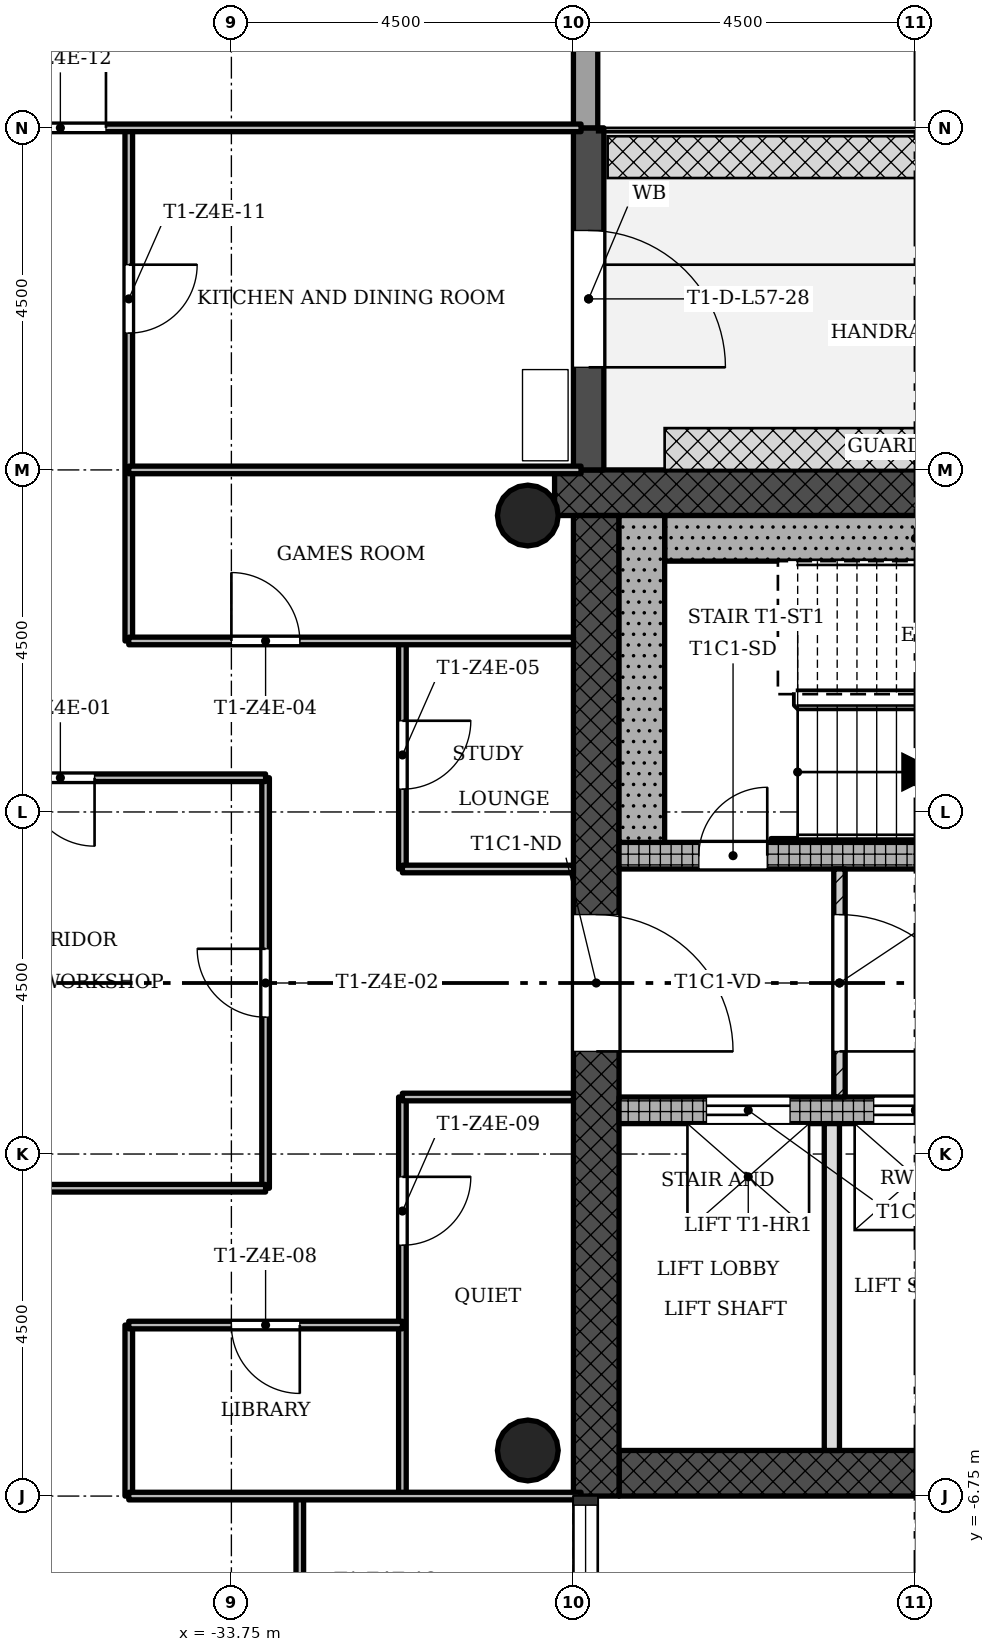
"""IFC4 building model, lengths in metres.
Left out: names, types, materials, properties, quantities, classifications, styles, units other than length and angle.
Written with IfcOpenShell. Run it as: python <this file> out.ifc"""

import sys

from ifc_helpers import new_model, si_unit, direction, frame, frame_2d, origin, origin_2d, place, context, subcontext, project, spatial, rectangle, hollow_circle, extrude, element, fill, save


model = new_model("IFC4")
c1 = context("Model", 3, precision=1e-05, world=origin(), true_north=direction((0.0, 1.0)))
c2 = subcontext(c1, "Body", "Model", "MODEL_VIEW")
j1 = project(units=[si_unit("LENGTHUNIT", "METRE"), si_unit("PLANEANGLEUNIT", "RADIAN")], contexts=[c1])
p1 = place(None, origin())
s1 = spatial("IfcSite", under=j1, at=p1, CompositionType="ELEMENT")
p2 = place(p1, origin())
s2 = spatial("IfcBuilding", under=s1, at=p2, CompositionType="ELEMENT")
p3 = place(p2, frame((0.0, 0.0, 206.2)))
s3 = spatial("IfcBuildingStorey", under=s2, at=p3, CompositionType="ELEMENT", Elevation=206.2)
p4 = place(p3, frame((-28.65, -6.45, 0.0), z_axis=(0.0, 0.0, 1.0), x_axis=(1.0, 0.0, 0.0)))
e1 = element("IfcWall", 1, at=p4, inside=s3, PredefinedType="SHEAR", context=c2, shape_type="SweptSolid", body=[
    extrude(rectangle(XDim=8.4, YDim=0.6, at=frame_2d((4.2, 0.0))), origin(), (0.0, 0.0, 1.0), 3.4),
])
p5 = place(p3, frame((-20.602, 6.45, 0.0), z_axis=(0.0, 0.0, 1.0), x_axis=(-1.0, 0.0, 0.0)))
e2 = element("IfcWall", 2, at=p5, inside=s3, PredefinedType="SHEAR", context=c2, shape_type="SweptSolid", body=[
    extrude(rectangle(XDim=8.896, YDim=0.6, at=frame_2d((4.448, 0.0))), origin(), (0.0, 0.0, 1.0), 3.4),
])
p6 = place(p3, frame((-28.95, 6.15, 0.0), z_axis=(0.0, 0.0, 1.0), x_axis=(0.0, -1.0, 0.0)))
e3 = element("IfcWall", 3, at=p6, inside=s3, PredefinedType="SHEAR", context=c2, shape_type="SweptSolid", body=[
    extrude(rectangle(XDim=12.9, YDim=0.6, at=frame_2d((6.45, 0.0))), origin(), (0.0, 0.0, 1.0), 3.4),
])
p7 = place(p6, frame((5.25, 0.0, 0.0)))
e4 = element("IfcOpeningElement", 4, at=p7, cuts=e3, PredefinedType="OPENING", context=c2, shape_type="SweptSolid", body=[
    extrude(rectangle(XDim=1.8, YDim=2.1, at=frame_2d((0.9, 1.05))), frame((0.0, 0.31, 0.0), z_axis=(0.0, -1.0, 0.0), x_axis=(1.0, 0.0, 0.0)), (0.0, 0.0, 1.0), 0.62),
])
p8 = place(p3, frame((-28.65, -1.675, 0.0), z_axis=(0.0, 0.0, 1.0), x_axis=(1.0, 0.0, 0.0)))
e5 = element("IfcWall", 5, at=p8, inside=s3, PredefinedType="SHEAR", context=c2, shape_type="SweptSolid", body=[
    extrude(rectangle(XDim=7.8, YDim=0.35, at=frame_2d((3.9, 0.0))), origin(), (0.0, 0.0, 1.0), 3.4),
])
p9 = place(p8, frame((1.15, 0.0, 0.0)))
e6 = element("IfcOpeningElement", 6, at=p9, cuts=e5, PredefinedType="OPENING", context=c2, shape_type="SweptSolid", body=[
    extrude(rectangle(XDim=1.1, YDim=2.1, at=frame_2d((0.55, 1.05))), frame((0.0, 0.185, 0.0), z_axis=(0.0, -1.0, 0.0), x_axis=(1.0, 0.0, 0.0)), (0.0, 0.0, 1.0), 0.37),
])
p10 = place(p8, frame((3.35, 0.0, 0.0)))
e7 = element("IfcOpeningElement", 7, at=p10, cuts=e5, PredefinedType="OPENING", context=c2, shape_type="SweptSolid", body=[
    extrude(rectangle(XDim=1.1, YDim=2.1, at=frame_2d((0.55, 1.05))), frame((0.0, 0.185, 0.0), z_axis=(0.0, -1.0, 0.0), x_axis=(1.0, 0.0, 0.0)), (0.0, 0.0, 1.0), 0.37),
])
p11 = place(p8, frame((5.55, 0.0, 0.0)))
e8 = element("IfcOpeningElement", 8, at=p11, cuts=e5, PredefinedType="OPENING", context=c2, shape_type="SweptSolid", body=[
    extrude(rectangle(XDim=1.1, YDim=2.1, at=frame_2d((0.55, 1.05))), frame((0.0, 0.185, 0.0), z_axis=(0.0, -1.0, 0.0), x_axis=(1.0, 0.0, 0.0)), (0.0, 0.0, 1.0), 0.37),
])
p12 = place(p3, frame((-28.65, 1.675, 0.0), z_axis=(0.0, 0.0, 1.0), x_axis=(1.0, 0.0, 0.0)))
e9 = element("IfcWall", 9, at=p12, inside=s3, PredefinedType="SHEAR", context=c2, shape_type="SweptSolid", body=[
    extrude(rectangle(XDim=7.8, YDim=0.35, at=frame_2d((3.9, 0.0))), origin(), (0.0, 0.0, 1.0), 3.4),
])
p13 = place(p12, frame((1.05, 0.0, 0.0)))
e10 = element("IfcOpeningElement", 10, at=p13, cuts=e9, PredefinedType="OPENING", context=c2, shape_type="SweptSolid", body=[
    extrude(rectangle(XDim=0.9, YDim=2.1, at=frame_2d((0.45, 1.05))), frame((0.0, 0.185, 0.0), z_axis=(0.0, -1.0, 0.0), x_axis=(1.0, 0.0, 0.0)), (0.0, 0.0, 1.0), 0.37),
])
for number, where, z_axis, x_axis in (
    (11, (-29.85, -6.15, 0.0), (0.0, 0.0, 1.0), (1.0, 0.0, 0.0)),
    (12, (-29.85, 6.15, 0.0), (0.0, 0.0, 1.0), (1.0, 0.0, 0.0)),
):
    element("IfcColumn", number, at=place(p3, frame(where, z_axis=z_axis, x_axis=x_axis)), inside=s3, PredefinedType="COLUMN", context=c2, shape_type="SweptSolid", body=[
        extrude(hollow_circle(Radius=0.4, WallThickness=0.028, at=origin_2d()), origin(), (0.0, 0.0, 1.0), 3.4),
    ])
p14 = place(p3, frame((-29.05, 6.75, -0.02), z_axis=(0.0, 0.0, 1.0), x_axis=(0.0, 1.0, 0.0)))
e13 = element("IfcWall", 13, at=p14, inside=s3, PredefinedType="STANDARD", context=c2, shape_type="SweptSolid", body=[
    extrude(rectangle(XDim=4.5, YDim=0.4, at=frame_2d((2.25, 0.0))), origin(), (0.0, 0.0, 1.0), 3.12),
])
p15 = place(p14, frame((1.35, 0.0, 0.02)))
e14 = element("IfcOpeningElement", 14, at=p15, cuts=e13, PredefinedType="OPENING", context=c2, shape_type="SweptSolid", body=[
    extrude(rectangle(XDim=1.8, YDim=2.1, at=frame_2d((0.9, 1.05))), frame((0.0, 0.21, 0.0), z_axis=(0.0, -1.0, 0.0), x_axis=(1.0, 0.0, 0.0)), (0.0, 0.0, 1.0), 0.42),
])
p16 = place(p3, frame((-29.09, 11.25, -0.3), z_axis=(0.0, 0.0, 1.0), x_axis=(0.0, 1.0, 0.0)))
e15 = element("IfcWall", 15, at=p16, inside=s3, PredefinedType="STANDARD", context=c2, shape_type="SweptSolid", body=[
    extrude(rectangle(XDim=1.82, YDim=0.32, at=frame_2d((0.91, 0.0))), origin(), (0.0, 0.0, 1.0), 3.4),
])
p17 = place(p3, frame((-25.75, -1.5, 0.0), z_axis=(0.0, 0.0, 1.0), x_axis=(0.0, 1.0, 0.0)))
e16 = element("IfcWall", 16, at=p17, inside=s3, PredefinedType="PARTITIONING", context=c2, shape_type="SweptSolid", body=[
    extrude(rectangle(XDim=3.0, YDim=0.15, at=frame_2d((1.5, 0.0))), origin(), (0.0, 0.0, 1.0), 3.0),
])
p18 = place(p17, frame((0.6, 0.0, 0.0)))
e17 = element("IfcOpeningElement", 17, at=p18, cuts=e16, PredefinedType="OPENING", context=c2, shape_type="SweptSolid", body=[
    extrude(rectangle(XDim=1.8, YDim=2.1, at=frame_2d((0.9, 1.05))), frame((0.0, 0.085, 0.0), z_axis=(0.0, -1.0, 0.0), x_axis=(1.0, 0.0, 0.0)), (0.0, 0.0, 1.0), 0.17),
])
p19 = place(p3, frame((-25.85, -6.15, 0.0), z_axis=(0.0, 0.0, 1.0), x_axis=(0.0, 1.0, 0.0)))
e18 = element("IfcWall", 18, at=p19, inside=s3, PredefinedType="SOLIDWALL", context=c2, shape_type="SweptSolid", body=[
    extrude(rectangle(XDim=4.3, YDim=0.2, at=frame_2d((2.15, 0.0))), origin(), (0.0, 0.0, 1.0), 3.0),
])
p20 = place(p3, frame((-35.1, -6.75, 0.0), z_axis=(0.0, 0.0, 1.0), x_axis=(0.0, 1.0, 0.0)))
e19 = element("IfcWall", 19, at=p20, inside=s3, PredefinedType="PARTITIONING", context=c2, shape_type="SweptSolid", body=[
    extrude(rectangle(XDim=2.25, YDim=0.1, at=frame_2d((1.125, 0.0))), origin(), (0.0, 0.0, 1.0), 3.0),
])
p21 = place(p3, frame((-35.1, 4.5, 0.0), z_axis=(0.0, 0.0, 1.0), x_axis=(0.0, 1.0, 0.0)))
e20 = element("IfcWall", 20, at=p21, inside=s3, PredefinedType="PARTITIONING", context=c2, shape_type="SweptSolid", body=[
    extrude(rectangle(XDim=6.75, YDim=0.1, at=frame_2d((3.375, 0.0))), origin(), (0.0, 0.0, 1.0), 3.0),
])
p22 = place(p21, frame((4.05, 0.0, 0.0)))
e21 = element("IfcOpeningElement", 21, at=p22, cuts=e20, PredefinedType="OPENING", context=c2, shape_type="SweptSolid", body=[
    extrude(rectangle(XDim=0.9, YDim=2.1, at=frame_2d((0.45, 1.05))), frame((0.0, 0.06, 0.0), z_axis=(0.0, -1.0, 0.0), x_axis=(1.0, 0.0, 0.0)), (0.0, 0.0, 1.0), 0.12),
])
p23 = place(p3, frame((-33.3, -2.7, 0.0), z_axis=(0.0, 0.0, 1.0), x_axis=(0.0, 1.0, 0.0)))
e22 = element("IfcWall", 22, at=p23, inside=s3, PredefinedType="PARTITIONING", context=c2, shape_type="SweptSolid", body=[
    extrude(rectangle(XDim=5.4, YDim=0.1, at=frame_2d((2.7, 0.0))), origin(), (0.0, 0.0, 1.0), 3.0),
])
p24 = place(p23, frame((2.25, 0.0, 0.0)))
e23 = element("IfcOpeningElement", 23, at=p24, cuts=e22, PredefinedType="OPENING", context=c2, shape_type="SweptSolid", body=[
    extrude(rectangle(XDim=0.9, YDim=2.1, at=frame_2d((0.45, 1.05))), frame((0.0, 0.06, 0.0), z_axis=(0.0, -1.0, 0.0), x_axis=(1.0, 0.0, 0.0)), (0.0, 0.0, 1.0), 0.12),
])
p25 = place(p3, frame((-32.85, -11.25, 0.0), z_axis=(0.0, 0.0, 1.0), x_axis=(0.0, 1.0, 0.0)))
e24 = element("IfcWall", 24, at=p25, inside=s3, PredefinedType="PARTITIONING", context=c2, shape_type="SweptSolid", body=[
    extrude(rectangle(XDim=4.5, YDim=0.1, at=frame_2d((2.25, 0.0))), origin(), (0.0, 0.0, 1.0), 3.0),
])
p26 = place(p25, frame((1.8, 0.0, 0.0)))
e25 = element("IfcOpeningElement", 25, at=p26, cuts=e24, PredefinedType="OPENING", context=c2, shape_type="SweptSolid", body=[
    extrude(rectangle(XDim=0.9, YDim=2.1, at=frame_2d((0.45, 1.05))), frame((0.0, 0.06, 0.0), z_axis=(0.0, -1.0, 0.0), x_axis=(1.0, 0.0, 0.0)), (0.0, 0.0, 1.0), 0.12),
])
p27 = place(p3, frame((-31.5, -6.75, 0.0), z_axis=(0.0, 0.0, 1.0), x_axis=(0.0, 1.0, 0.0)))
e26 = element("IfcWall", 26, at=p27, inside=s3, PredefinedType="PARTITIONING", context=c2, shape_type="SweptSolid", body=[
    extrude(rectangle(XDim=5.25, YDim=0.1, at=frame_2d((2.625, 0.0))), origin(), (0.0, 0.0, 1.0), 3.0),
])
p28 = place(p27, frame((3.3, 0.0, 0.0)))
e27 = element("IfcOpeningElement", 27, at=p28, cuts=e26, PredefinedType="OPENING", context=c2, shape_type="SweptSolid", body=[
    extrude(rectangle(XDim=0.9, YDim=2.1, at=frame_2d((0.45, 1.05))), frame((0.0, 0.06, 0.0), z_axis=(0.0, -1.0, 0.0), x_axis=(1.0, 0.0, 0.0)), (0.0, 0.0, 1.0), 0.12),
])
p29 = place(p3, frame((-31.5, 1.5, 0.0), z_axis=(0.0, 0.0, 1.0), x_axis=(0.0, 1.0, 0.0)))
e28 = element("IfcWall", 28, at=p29, inside=s3, PredefinedType="PARTITIONING", context=c2, shape_type="SweptSolid", body=[
    extrude(rectangle(XDim=3.0, YDim=0.1, at=frame_2d((1.5, 0.0))), origin(), (0.0, 0.0, 1.0), 3.0),
])
p30 = place(p29, frame((1.05, 0.0, 0.0)))
e29 = element("IfcOpeningElement", 29, at=p30, cuts=e28, PredefinedType="OPENING", context=c2, shape_type="SweptSolid", body=[
    extrude(rectangle(XDim=0.9, YDim=2.1, at=frame_2d((0.45, 1.05))), frame((0.0, 0.06, 0.0), z_axis=(0.0, -1.0, 0.0), x_axis=(1.0, 0.0, 0.0)), (0.0, 0.0, 1.0), 0.12),
])
p31 = place(p3, frame((-35.1, -6.75, 0.0), z_axis=(0.0, 0.0, 1.0), x_axis=(1.0, 0.0, 0.0)))
e30 = element("IfcWall", 30, at=p31, inside=s3, PredefinedType="PARTITIONING", context=c2, shape_type="SweptSolid", body=[
    extrude(rectangle(XDim=5.95, YDim=0.1, at=frame_2d((2.975, 0.0))), origin(), (0.0, 0.0, 1.0), 3.0),
])
p32 = place(p3, frame((-35.1, -4.5, 0.0), z_axis=(0.0, 0.0, 1.0), x_axis=(1.0, 0.0, 0.0)))
e31 = element("IfcWall", 31, at=p32, inside=s3, PredefinedType="PARTITIONING", context=c2, shape_type="SweptSolid", body=[
    extrude(rectangle(XDim=3.6, YDim=0.1, at=frame_2d((1.8, 0.0))), origin(), (0.0, 0.0, 1.0), 3.0),
])
p33 = place(p32, frame((1.35, 0.0, 0.0)))
e32 = element("IfcOpeningElement", 32, at=p33, cuts=e31, PredefinedType="OPENING", context=c2, shape_type="SweptSolid", body=[
    extrude(rectangle(XDim=0.9, YDim=2.1, at=frame_2d((0.45, 1.05))), frame((0.0, 0.06, 0.0), z_axis=(0.0, -1.0, 0.0), x_axis=(1.0, 0.0, 0.0)), (0.0, 0.0, 1.0), 0.12),
])
p34 = place(p3, frame((-38.7, -2.7, 0.0), z_axis=(0.0, 0.0, 1.0), x_axis=(1.0, 0.0, 0.0)))
e33 = element("IfcWall", 33, at=p34, inside=s3, PredefinedType="PARTITIONING", context=c2, shape_type="SweptSolid", body=[
    extrude(rectangle(XDim=5.4, YDim=0.1, at=frame_2d((2.7, 0.0))), origin(), (0.0, 0.0, 1.0), 3.0),
])
for number, where, z_axis, x_axis in (
    (34, (-31.5, -1.5, 0.0), (0.0, 0.0, 1.0), (1.0, 0.0, 0.0)),
    (35, (-31.5, 1.5, 0.0), (0.0, 0.0, 1.0), (1.0, 0.0, 0.0)),
):
    element("IfcWall", number, at=place(p3, frame(where, z_axis=z_axis, x_axis=x_axis)), inside=s3, PredefinedType="PARTITIONING", context=c2, shape_type="SweptSolid", body=[
        extrude(rectangle(XDim=2.25, YDim=0.1, at=frame_2d((1.125, 0.0))), origin(), (0.0, 0.0, 1.0), 3.0),
    ])
p35 = place(p3, frame((-38.7, 2.7, 0.0), z_axis=(0.0, 0.0, 1.0), x_axis=(1.0, 0.0, 0.0)))
e36 = element("IfcWall", 36, at=p35, inside=s3, PredefinedType="PARTITIONING", context=c2, shape_type="SweptSolid", body=[
    extrude(rectangle(XDim=5.4, YDim=0.1, at=frame_2d((2.7, 0.0))), origin(), (0.0, 0.0, 1.0), 3.0),
])
p36 = place(p35, frame((2.25, 0.0, 0.0)))
e37 = element("IfcOpeningElement", 37, at=p36, cuts=e36, PredefinedType="OPENING", context=c2, shape_type="SweptSolid", body=[
    extrude(rectangle(XDim=0.9, YDim=2.1, at=frame_2d((0.45, 1.05))), frame((0.0, 0.06, 0.0), z_axis=(0.0, -1.0, 0.0), x_axis=(1.0, 0.0, 0.0)), (0.0, 0.0, 1.0), 0.12),
])
p37 = place(p3, frame((-35.1, 4.5, 0.0), z_axis=(0.0, 0.0, 1.0), x_axis=(1.0, 0.0, 0.0)))
e38 = element("IfcWall", 38, at=p37, inside=s3, PredefinedType="PARTITIONING", context=c2, shape_type="SweptSolid", body=[
    extrude(rectangle(XDim=5.85, YDim=0.1, at=frame_2d((2.925, 0.0))), origin(), (0.0, 0.0, 1.0), 3.0),
])
p38 = place(p37, frame((1.35, 0.0, 0.0)))
e39 = element("IfcOpeningElement", 39, at=p38, cuts=e38, PredefinedType="OPENING", context=c2, shape_type="SweptSolid", body=[
    extrude(rectangle(XDim=0.9, YDim=2.1, at=frame_2d((0.45, 1.05))), frame((0.0, 0.06, 0.0), z_axis=(0.0, -1.0, 0.0), x_axis=(1.0, 0.0, 0.0)), (0.0, 0.0, 1.0), 0.12),
])
p39 = place(p3, frame((-35.1, 6.75, 0.0), z_axis=(0.0, 0.0, 1.0), x_axis=(1.0, 0.0, 0.0)))
e40 = element("IfcWall", 40, at=p39, inside=s3, PredefinedType="PARTITIONING", context=c2, shape_type="SweptSolid", body=[
    extrude(rectangle(XDim=5.95, YDim=0.1, at=frame_2d((2.975, 0.0))), origin(), (0.0, 0.0, 1.0), 3.0),
])
p40 = place(p3, frame((-42.85, 11.25, 0.0), z_axis=(0.0, 0.0, 1.0), x_axis=(1.0, 0.0, 0.0)))
e41 = element("IfcWall", 41, at=p40, inside=s3, PredefinedType="PARTITIONING", context=c2, shape_type="SweptSolid", body=[
    extrude(rectangle(XDim=13.7, YDim=0.1, at=frame_2d((6.85, 0.0))), origin(), (0.0, 0.0, 1.0), 3.0),
])
p41 = place(p40, frame((6.25, 0.0, 0.0)))
e42 = element("IfcOpeningElement", 42, at=p41, cuts=e41, PredefinedType="OPENING", context=c2, shape_type="SweptSolid", body=[
    extrude(rectangle(XDim=1.2, YDim=2.1, at=frame_2d((0.6, 1.05))), frame((0.0, 0.06, 0.0), z_axis=(0.0, -1.0, 0.0), x_axis=(1.0, 0.0, 0.0)), (0.0, 0.0, 1.0), 0.12),
])
p42 = place(p3, frame((-28.05, 5.85, 0.0), z_axis=(0.0, 0.0, 1.0), x_axis=(1.0, 0.0, 0.0)))
e43 = element("IfcWall", 43, at=p42, inside=s3, PredefinedType="SHEAR", context=c2, shape_type="SweptSolid", body=[
    extrude(rectangle(XDim=6.6, YDim=0.6, at=frame_2d((3.3, 0.0))), origin(), (0.0, 0.0, 1.0), 3.4),
])
p43 = place(p3, frame((-28.35, 1.85, 0.0), z_axis=(0.0, 0.0, 1.0), x_axis=(0.0, 1.0, 0.0)))
e44 = element("IfcWall", 44, at=p43, inside=s3, PredefinedType="SHEAR", context=c2, shape_type="SweptSolid", body=[
    extrude(rectangle(XDim=4.3, YDim=0.6, at=frame_2d((2.15, 0.0))), origin(), (0.0, 0.0, 1.0), 3.4),
])
p44 = place(p3, frame((-26.65, 1.875, 0.0), z_axis=(0.0, 0.0, 1.0), x_axis=(1.0, 0.0, 0.0)))
e45 = element("IfcWall", 45, at=p44, inside=s3, PredefinedType="SHEAR", context=c2, shape_type="SweptSolid", body=[
    extrude(rectangle(XDim=5.2, YDim=0.05, at=frame_2d((2.6, 0.0))), origin(), (0.0, 0.0, 1.0), 3.4),
])
p45 = place(p15, origin())
e46 = element("IfcDoor", 46, at=p45, inside=s3, OperationType="SINGLE_SWING_LEFT", PredefinedType="DOOR", context=c2, shape_type="SweptSolid", body=[
    extrude(rectangle(XDim=1.8, YDim=2.1, at=frame_2d((0.9, 1.05))), frame((0.0, 0.025, 0.0), z_axis=(0.0, -1.0, 0.0), x_axis=(1.0, 0.0, 0.0)), (0.0, 0.0, 1.0), 0.05),
])
fill(e14, e46)
p46 = place(p18, origin())
e47 = element("IfcDoor", 47, at=p46, inside=s3, OperationType="SINGLE_SWING_LEFT", PredefinedType="DOOR", context=c2, shape_type="SweptSolid", body=[
    extrude(rectangle(XDim=1.8, YDim=2.1, at=frame_2d((0.9, 1.05))), frame((0.0, 0.025, 0.0), z_axis=(0.0, -1.0, 0.0), x_axis=(1.0, 0.0, 0.0)), (0.0, 0.0, 1.0), 0.05),
])
fill(e17, e47)
p47 = place(p36, origin())
e48 = element("IfcDoor", 48, at=p47, inside=s3, OperationType="SINGLE_SWING_RIGHT", PredefinedType="DOOR", context=c2, shape_type="SweptSolid", body=[
    extrude(rectangle(XDim=0.9, YDim=2.1, at=frame_2d((0.45, 1.05))), frame((0.0, 0.025, 0.0), z_axis=(0.0, -1.0, 0.0), x_axis=(1.0, 0.0, 0.0)), (0.0, 0.0, 1.0), 0.05),
])
fill(e37, e48)
p48 = place(p24, origin())
e49 = element("IfcDoor", 49, at=p48, inside=s3, OperationType="SINGLE_SWING_LEFT", PredefinedType="DOOR", context=c2, shape_type="SweptSolid", body=[
    extrude(rectangle(XDim=0.9, YDim=2.1, at=frame_2d((0.45, 1.05))), frame((0.0, 0.025, 0.0), z_axis=(0.0, -1.0, 0.0), x_axis=(1.0, 0.0, 0.0)), (0.0, 0.0, 1.0), 0.05),
])
fill(e23, e49)
p49 = place(p38, origin())
e50 = element("IfcDoor", 50, at=p49, inside=s3, OperationType="SINGLE_SWING_RIGHT", PredefinedType="DOOR", context=c2, shape_type="SweptSolid", body=[
    extrude(rectangle(XDim=0.9, YDim=2.1, at=frame_2d((0.45, 1.05))), frame((0.0, 0.025, 0.0), z_axis=(0.0, -1.0, 0.0), x_axis=(1.0, 0.0, 0.0)), (0.0, 0.0, 1.0), 0.05),
])
fill(e39, e50)
p50 = place(p30, origin())
e51 = element("IfcDoor", 51, at=p50, inside=s3, OperationType="SINGLE_SWING_RIGHT", PredefinedType="DOOR", context=c2, shape_type="SweptSolid", body=[
    extrude(rectangle(XDim=0.9, YDim=2.1, at=frame_2d((0.45, 1.05))), frame((0.0, 0.025, 0.0), z_axis=(0.0, -1.0, 0.0), x_axis=(1.0, 0.0, 0.0)), (0.0, 0.0, 1.0), 0.05),
])
fill(e29, e51)
p51 = place(p33, origin())
e52 = element("IfcDoor", 52, at=p51, inside=s3, OperationType="SINGLE_SWING_RIGHT", PredefinedType="DOOR", context=c2, shape_type="SweptSolid", body=[
    extrude(rectangle(XDim=0.9, YDim=2.1, at=frame_2d((0.45, 1.05))), frame((0.0, 0.025, 0.0), z_axis=(0.0, -1.0, 0.0), x_axis=(1.0, 0.0, 0.0)), (0.0, 0.0, 1.0), 0.05),
])
fill(e32, e52)
p52 = place(p28, origin())
e53 = element("IfcDoor", 53, at=p52, inside=s3, OperationType="SINGLE_SWING_RIGHT", PredefinedType="DOOR", context=c2, shape_type="SweptSolid", body=[
    extrude(rectangle(XDim=0.9, YDim=2.1, at=frame_2d((0.45, 1.05))), frame((0.0, 0.025, 0.0), z_axis=(0.0, -1.0, 0.0), x_axis=(1.0, 0.0, 0.0)), (0.0, 0.0, 1.0), 0.05),
])
fill(e27, e53)
p53 = place(p22, origin())
e54 = element("IfcDoor", 54, at=p53, inside=s3, OperationType="SINGLE_SWING_RIGHT", PredefinedType="DOOR", context=c2, shape_type="SweptSolid", body=[
    extrude(rectangle(XDim=0.9, YDim=2.1, at=frame_2d((0.45, 1.05))), frame((0.0, 0.025, 0.0), z_axis=(0.0, -1.0, 0.0), x_axis=(1.0, 0.0, 0.0)), (0.0, 0.0, 1.0), 0.05),
])
fill(e21, e54)
p54 = place(p41, origin())
e55 = element("IfcDoor", 55, at=p54, inside=s3, OperationType="SINGLE_SWING_LEFT", PredefinedType="DOOR", context=c2, shape_type="SweptSolid", body=[
    extrude(rectangle(XDim=1.2, YDim=2.1, at=frame_2d((0.6, 1.05))), frame((0.0, 0.025, 0.0), z_axis=(0.0, -1.0, 0.0), x_axis=(1.0, 0.0, 0.0)), (0.0, 0.0, 1.0), 0.05),
])
fill(e42, e55)
p55 = place(p13, origin())
e56 = element("IfcDoor", 56, at=p55, inside=s3, OperationType="SINGLE_SWING_LEFT", PredefinedType="DOOR", context=c2, shape_type="SweptSolid", body=[
    extrude(rectangle(XDim=0.9, YDim=2.1, at=frame_2d((0.45, 1.05))), frame((0.0, 0.025, 0.0), z_axis=(0.0, -1.0, 0.0), x_axis=(1.0, 0.0, 0.0)), (0.0, 0.0, 1.0), 0.05),
])
fill(e10, e56)
p56 = place(p9, origin())
e57 = element("IfcDoor", 57, at=p56, inside=s3, OperationType="SLIDING_TO_LEFT", PredefinedType="DOOR", context=c2, shape_type="SweptSolid", body=[
    extrude(rectangle(XDim=1.1, YDim=2.1, at=frame_2d((0.55, 1.05))), frame((0.0, 0.025, 0.0), z_axis=(0.0, -1.0, 0.0), x_axis=(1.0, 0.0, 0.0)), (0.0, 0.0, 1.0), 0.05),
])
fill(e6, e57)
p57 = place(p10, origin())
e58 = element("IfcDoor", 58, at=p57, inside=s3, OperationType="SLIDING_TO_LEFT", PredefinedType="DOOR", context=c2, shape_type="SweptSolid", body=[
    extrude(rectangle(XDim=1.1, YDim=2.1, at=frame_2d((0.55, 1.05))), frame((0.0, 0.025, 0.0), z_axis=(0.0, -1.0, 0.0), x_axis=(1.0, 0.0, 0.0)), (0.0, 0.0, 1.0), 0.05),
])
fill(e7, e58)
p58 = place(p7, origin())
e59 = element("IfcDoor", 59, at=p58, inside=s3, OperationType="SINGLE_SWING_LEFT", PredefinedType="DOOR", context=c2, shape_type="SweptSolid", body=[
    extrude(rectangle(XDim=1.8, YDim=2.1, at=frame_2d((0.9, 1.05))), frame((0.0, 0.025, 0.0), z_axis=(0.0, -1.0, 0.0), x_axis=(1.0, 0.0, 0.0)), (0.0, 0.0, 1.0), 0.05),
])
fill(e4, e59)
save(model, sys.argv[1])
